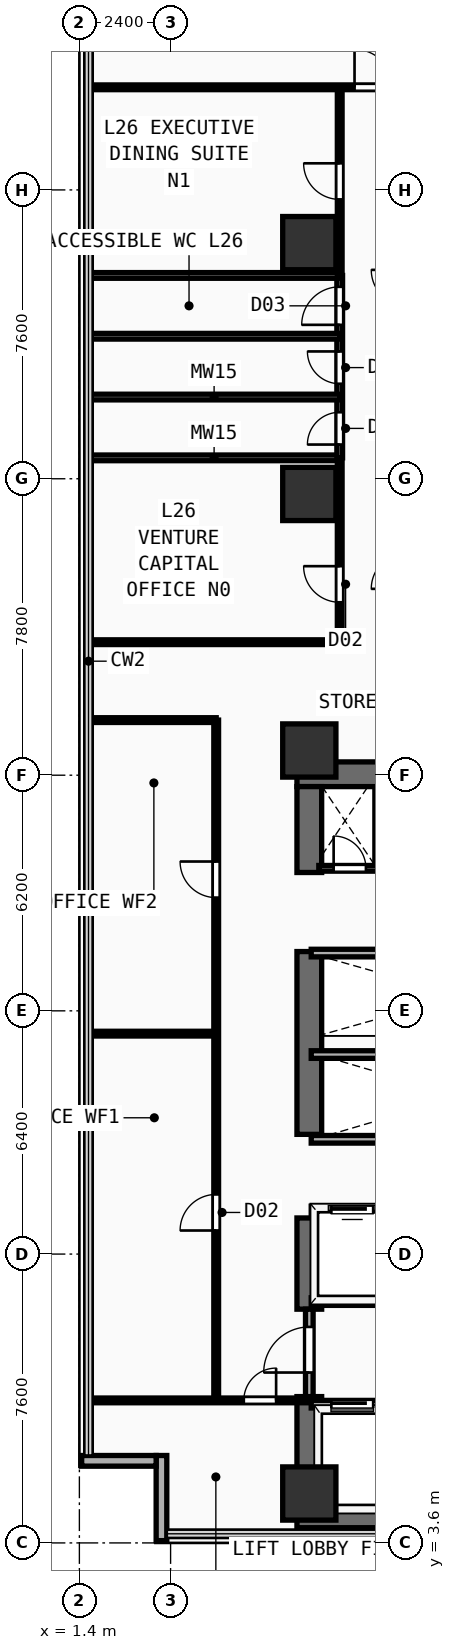
"""IFC4 building model, lengths in metres.
Left out: names, types, materials, properties, quantities, classifications, styles, units other than length and angle.
Written with IfcOpenShell. Run it as: python <this file> out.ifc"""

import sys

from ifc_helpers import new_model, si_unit, direction, frame, frame_2d, origin, origin_2d, place, context, subcontext, project, spatial, rectangle, extrude, element, fill, save


model = new_model("IFC4")
c1 = context("Model", 3, precision=1e-05, world=origin(), true_north=direction((0.0, 1.0)))
c2 = subcontext(c1, "Body", "Model", "MODEL_VIEW")
j1 = project(units=[si_unit("LENGTHUNIT", "METRE"), si_unit("PLANEANGLEUNIT", "RADIAN")], contexts=[c1])
p1 = place(None, origin())
s1 = spatial("IfcSite", under=j1, at=p1, CompositionType="ELEMENT")
p2 = place(p1, origin())
s2 = spatial("IfcBuilding", under=s1, at=p2, CompositionType="ELEMENT")
p3 = place(p2, frame((0.0, 0.0, 103.1)))
s3 = spatial("IfcBuildingStorey", under=s2, at=p3, CompositionType="ELEMENT", Elevation=103.1)
for number, where, z_axis, x_axis in (
    (1, (7.125, 4.325, 0.0), (0.0, 0.0, 1.0), (1.0, 0.0, 0.0)),
    (2, (7.125, 23.825, 0.0), (0.0, 0.0, 1.0), (1.0, 0.0, 0.0)),
):
    element("IfcWall", number, at=place(p3, frame(where, z_axis=z_axis, x_axis=x_axis)), inside=s3, PredefinedType="SHEAR", context=c2, shape_type="SweptSolid", body=[
        extrude(rectangle(XDim=14.0, YDim=0.65, at=frame_2d((7.0, 0.0))), origin(), (0.0, 0.0, 1.0), 3.54),
    ])
p4 = place(p3, frame((7.45, 4.65, 0.0), z_axis=(0.0, 0.0, 1.0), x_axis=(0.0, 1.0, 0.0)))
e3 = element("IfcWall", 3, at=p4, inside=s3, PredefinedType="SHEAR", context=c2, shape_type="SweptSolid", body=[
    extrude(rectangle(XDim=2.8, YDim=0.65, at=frame_2d((1.4, 0.0))), origin(), (0.0, 0.0, 1.0), 3.54),
])
p5 = place(p3, frame((7.45, 9.75, 0.0), z_axis=(0.0, 0.0, 1.0), x_axis=(0.0, 1.0, 0.0)))
e4 = element("IfcWall", 4, at=p5, inside=s3, PredefinedType="SHEAR", context=c2, shape_type="SweptSolid", body=[
    extrude(rectangle(XDim=2.4, YDim=0.65, at=frame_2d((1.2, 0.0))), origin(), (0.0, 0.0, 1.0), 3.54),
])
p6 = place(p3, frame((7.45, 14.35, 0.0), z_axis=(0.0, 0.0, 1.0), x_axis=(0.0, 1.0, 0.0)))
e5 = element("IfcWall", 5, at=p6, inside=s3, PredefinedType="SHEAR", context=c2, shape_type="SweptSolid", body=[
    extrude(rectangle(XDim=4.81, YDim=0.65, at=frame_2d((2.405, 0.0))), origin(), (0.0, 0.0, 1.0), 3.54),
])
p7 = place(p3, frame((7.45, 21.24, 0.0), z_axis=(0.0, 0.0, 1.0), x_axis=(0.0, 1.0, 0.0)))
e6 = element("IfcWall", 6, at=p7, inside=s3, PredefinedType="SHEAR", context=c2, shape_type="SweptSolid", body=[
    extrude(rectangle(XDim=2.26, YDim=0.65, at=frame_2d((1.13, 0.0))), origin(), (0.0, 0.0, 1.0), 3.54),
])
for number, where, z_axis, x_axis in (
    (7, (7.45, 4.9, 0.0), (0.0, 0.0, 1.0), (1.0, 0.0, 0.0)),
    (8, (7.45, 24.45, 0.0), (0.0, 0.0, 1.0), (1.0, 0.0, 0.0)),
    (9, (7.45, 31.2, 0.0), (0.0, 0.0, 1.0), (1.0, 0.0, 0.0)),
    (10, (7.45, 37.8, 0.0), (0.0, 0.0, 1.0), (1.0, 0.0, 0.0)),
):
    element("IfcColumn", number, at=place(p3, frame(where, z_axis=z_axis, x_axis=x_axis)), inside=s3, PredefinedType="COLUMN", context=c2, shape_type="SweptSolid", body=[
        extrude(rectangle(XDim=1.4, YDim=1.4, at=origin_2d()), origin(), (0.0, 0.0, 1.0), 3.54),
    ])
p8 = place(p3, frame((3.56, 3.66, 0.0), z_axis=(0.0, 0.0, 1.0), x_axis=(0.0, 1.0, 0.0)))
e11 = element("IfcWall", 11, at=p8, inside=s3, PredefinedType="SOLIDWALL", context=c2, shape_type="SweptSolid", body=[
    extrude(rectangle(XDim=2.24, YDim=0.28, at=frame_2d((1.12, 0.0))), origin(), (0.0, 0.0, 1.0), 3.54),
])
p9 = place(p3, frame((1.46, 5.76, 0.0), z_axis=(0.0, 0.0, 1.0), x_axis=(1.0, 0.0, 0.0)))
e12 = element("IfcWall", 12, at=p9, inside=s3, PredefinedType="SOLIDWALL", context=c2, shape_type="SweptSolid", body=[
    extrude(rectangle(XDim=1.96, YDim=0.28, at=frame_2d((0.98, 0.0))), origin(), (0.0, 0.0, 1.0), 3.54),
])
p10 = place(p3, frame((7.5, 7.25, 0.0), z_axis=(0.0, 0.0, 1.0), x_axis=(1.0, 0.0, 0.0)))
e13 = element("IfcWall", 13, at=p10, inside=s3, PredefinedType="PARTITIONING", context=c2, shape_type="SweptSolid", body=[
    extrude(rectangle(XDim=8.35, YDim=0.2, at=frame_2d((4.175, 0.0))), origin(), (0.0, 0.0, 1.0), 3.54),
])
p11 = place(p10, frame((0.53, 0.0, 0.0)))
e14 = element("IfcOpeningElement", 14, at=p11, cuts=e13, PredefinedType="OPENING", context=c2, shape_type="SweptSolid", body=[
    extrude(rectangle(XDim=1.1, YDim=2.2, at=frame_2d((0.55, 1.1))), frame((0.0, 0.11, 0.0), z_axis=(0.0, -1.0, 0.0), x_axis=(1.0, 0.0, 0.0)), (0.0, 0.0, 1.0), 0.22),
])
p12 = place(p10, frame((2.37, 0.0, 0.0)))
e15 = element("IfcOpeningElement", 15, at=p12, cuts=e13, PredefinedType="OPENING", context=c2, shape_type="SweptSolid", body=[
    extrude(rectangle(XDim=1.1, YDim=2.2, at=frame_2d((0.55, 1.1))), frame((0.0, 0.11, 0.0), z_axis=(0.0, -1.0, 0.0), x_axis=(1.0, 0.0, 0.0)), (0.0, 0.0, 1.0), 0.22),
])
p13 = place(p10, frame((4.33, 0.0, 0.0)))
e16 = element("IfcOpeningElement", 16, at=p13, cuts=e13, PredefinedType="OPENING", context=c2, shape_type="SweptSolid", body=[
    extrude(rectangle(XDim=1.1, YDim=2.2, at=frame_2d((0.55, 1.1))), frame((0.0, 0.11, 0.0), z_axis=(0.0, -1.0, 0.0), x_axis=(1.0, 0.0, 0.0)), (0.0, 0.0, 1.0), 0.22),
])
p14 = place(p10, frame((6.5, 0.0, 0.0)))
e17 = element("IfcOpeningElement", 17, at=p14, cuts=e13, PredefinedType="OPENING", context=c2, shape_type="SweptSolid", body=[
    extrude(rectangle(XDim=1.1, YDim=2.2, at=frame_2d((0.55, 1.1))), frame((0.0, 0.11, 0.0), z_axis=(0.0, -1.0, 0.0), x_axis=(1.0, 0.0, 0.0)), (0.0, 0.0, 1.0), 0.22),
])
p15 = place(p3, frame((7.5, 9.95, 0.0), z_axis=(0.0, 0.0, 1.0), x_axis=(1.0, 0.0, 0.0)))
e18 = element("IfcWall", 18, at=p15, inside=s3, PredefinedType="PARTITIONING", context=c2, shape_type="SweptSolid", body=[
    extrude(rectangle(XDim=8.35, YDim=0.2, at=frame_2d((4.175, 0.0))), origin(), (0.0, 0.0, 1.0), 3.54),
])
p16 = place(p3, frame((7.45, 7.45, 0.0), z_axis=(0.0, 0.0, 1.0), x_axis=(0.0, 1.0, 0.0)))
e19 = element("IfcWall", 19, at=p16, inside=s3, PredefinedType="PARTITIONING", context=c2, shape_type="SweptSolid", body=[
    extrude(rectangle(XDim=2.3, YDim=0.2, at=frame_2d((1.15, 0.0))), origin(), (0.0, 0.0, 1.0), 2.52),
])
p17 = place(p16, frame((0.633, 0.0, 0.0)))
e20 = element("IfcOpeningElement", 20, at=p17, cuts=e19, PredefinedType="OPENING", context=c2, shape_type="SweptSolid", body=[
    extrude(rectangle(XDim=1.2, YDim=2.25, at=frame_2d((0.6, 1.125))), frame((0.0, 0.11, 0.0), z_axis=(0.0, -1.0, 0.0), x_axis=(1.0, 0.0, 0.0)), (0.0, 0.0, 1.0), 0.22),
])
p18 = place(p3, frame((7.5, 12.36, 0.0), z_axis=(0.0, 0.0, 1.0), x_axis=(1.0, 0.0, 0.0)))
e21 = element("IfcWall", 21, at=p18, inside=s3, PredefinedType="PARTITIONING", context=c2, shape_type="SweptSolid", body=[
    extrude(rectangle(XDim=7.85, YDim=0.2, at=frame_2d((3.925, 0.0))), origin(), (0.0, 0.0, 1.0), 3.54),
])
p19 = place(p18, frame((0.53, 0.0, 0.0)))
e22 = element("IfcOpeningElement", 22, at=p19, cuts=e21, PredefinedType="OPENING", context=c2, shape_type="SweptSolid", body=[
    extrude(rectangle(XDim=1.1, YDim=2.2, at=frame_2d((0.55, 1.1))), frame((0.0, 0.11, 0.0), z_axis=(0.0, -1.0, 0.0), x_axis=(1.0, 0.0, 0.0)), (0.0, 0.0, 1.0), 0.22),
])
p20 = place(p18, frame((2.42, 0.0, 0.0)))
e23 = element("IfcOpeningElement", 23, at=p20, cuts=e21, PredefinedType="OPENING", context=c2, shape_type="SweptSolid", body=[
    extrude(rectangle(XDim=1.1, YDim=2.2, at=frame_2d((0.55, 1.1))), frame((0.0, 0.11, 0.0), z_axis=(0.0, -1.0, 0.0), x_axis=(1.0, 0.0, 0.0)), (0.0, 0.0, 1.0), 0.22),
])
p21 = place(p18, frame((4.31, 0.0, 0.0)))
e24 = element("IfcOpeningElement", 24, at=p21, cuts=e21, PredefinedType="OPENING", context=c2, shape_type="SweptSolid", body=[
    extrude(rectangle(XDim=1.1, YDim=2.2, at=frame_2d((0.55, 1.1))), frame((0.0, 0.11, 0.0), z_axis=(0.0, -1.0, 0.0), x_axis=(1.0, 0.0, 0.0)), (0.0, 0.0, 1.0), 0.22),
])
p22 = place(p18, frame((6.2, 0.0, 0.0)))
e25 = element("IfcOpeningElement", 25, at=p22, cuts=e21, PredefinedType="OPENING", context=c2, shape_type="SweptSolid", body=[
    extrude(rectangle(XDim=1.1, YDim=2.2, at=frame_2d((0.55, 1.1))), frame((0.0, 0.11, 0.0), z_axis=(0.0, -1.0, 0.0), x_axis=(1.0, 0.0, 0.0)), (0.0, 0.0, 1.0), 0.22),
])
for number, where, z_axis, x_axis in (
    (26, (7.5, 14.22, 0.0), (0.0, 0.0, 1.0), (1.0, 0.0, 0.0)),
    (27, (7.5, 16.45, 0.0), (0.0, 0.0, 1.0), (1.0, 0.0, 0.0)),
    (28, (7.5, 19.12, 0.0), (0.0, 0.0, 1.0), (1.0, 0.0, 0.0)),
):
    element("IfcWall", number, at=place(p3, frame(where, z_axis=z_axis, x_axis=x_axis)), inside=s3, PredefinedType="PARTITIONING", context=c2, shape_type="SweptSolid", body=[
        extrude(rectangle(XDim=7.85, YDim=0.2, at=frame_2d((3.925, 0.0))), origin(), (0.0, 0.0, 1.0), 3.54),
    ])
p23 = place(p3, frame((9.25, 21.35, 0.0), z_axis=(0.0, 0.0, 1.0), x_axis=(0.0, 1.0, 0.0)))
e29 = element("IfcWall", 29, at=p23, inside=s3, PredefinedType="PARTITIONING", context=c2, shape_type="SweptSolid", body=[
    extrude(rectangle(XDim=2.13, YDim=0.15, at=frame_2d((1.065, 0.0))), origin(), (0.0, 0.0, 1.0), 3.54),
])
p24 = place(p3, frame((7.7, 21.35, 0.0), z_axis=(0.0, 0.0, 1.0), x_axis=(1.0, 0.0, 0.0)))
e30 = element("IfcWall", 30, at=p24, inside=s3, PredefinedType="PARTITIONING", context=c2, shape_type="SweptSolid", body=[
    extrude(rectangle(XDim=1.55, YDim=0.15, at=frame_2d((0.775, 0.0))), origin(), (0.0, 0.0, 1.0), 3.54),
])
p25 = place(p24, frame((0.39, 0.0, 0.0)))
e31 = element("IfcOpeningElement", 31, at=p25, cuts=e30, PredefinedType="OPENING", context=c2, shape_type="SweptSolid", body=[
    extrude(rectangle(XDim=0.85, YDim=2.15, at=frame_2d((0.425, 1.075))), frame((0.0, 0.085, 0.0), z_axis=(0.0, -1.0, 0.0), x_axis=(1.0, 0.0, 0.0)), (0.0, 0.0, 1.0), 0.17),
])
p26 = place(p3, frame((8.25, 27.3, 0.0), z_axis=(0.0, 0.0, 1.0), x_axis=(0.0, 1.0, 0.0)))
e32 = element("IfcWall", 32, at=p26, inside=s3, PredefinedType="PARTITIONING", context=c2, shape_type="SweptSolid", body=[
    extrude(rectangle(XDim=4.85, YDim=0.125, at=frame_2d((2.425, 0.0))), origin(), (0.0, 0.0, 1.0), 3.54),
])
p27 = place(p26, frame((1.05, 0.0, 0.0)))
e33 = element("IfcOpeningElement", 33, at=p27, cuts=e32, PredefinedType="OPENING", context=c2, shape_type="SweptSolid", body=[
    extrude(rectangle(XDim=0.95, YDim=2.15, at=frame_2d((0.475, 1.075))), frame((0.0, 0.073, 0.0), z_axis=(0.0, -1.0, 0.0), x_axis=(1.0, 0.0, 0.0)), (0.0, 0.0, 1.0), 0.145),
])
p28 = place(p3, frame((1.64, 27.3, 0.0), z_axis=(0.0, 0.0, 1.0), x_axis=(1.0, 0.0, 0.0)))
e34 = element("IfcWall", 34, at=p28, inside=s3, PredefinedType="PARTITIONING", context=c2, shape_type="SweptSolid", body=[
    extrude(rectangle(XDim=6.61, YDim=0.125, at=frame_2d((3.305, 0.0))), origin(), (0.0, 0.0, 1.0), 3.54),
])
p29 = place(p3, frame((1.64, 32.15, 0.0), z_axis=(0.0, 0.0, 1.0), x_axis=(1.0, 0.0, 0.0)))
e35 = element("IfcWall", 35, at=p29, inside=s3, PredefinedType="PLUMBINGWALL", context=c2, shape_type="SweptSolid", body=[
    extrude(rectangle(XDim=6.61, YDim=0.15, at=frame_2d((3.305, 0.0))), origin(), (0.0, 0.0, 1.0), 3.54),
])
p30 = place(p3, frame((8.25, 32.15, 0.0), z_axis=(0.0, 0.0, 1.0), x_axis=(0.0, 1.0, 0.0)))
e36 = element("IfcWall", 36, at=p30, inside=s3, PredefinedType="PLUMBINGWALL", context=c2, shape_type="SweptSolid", body=[
    extrude(rectangle(XDim=4.8, YDim=0.15, at=frame_2d((2.4, 0.0))), origin(), (0.0, 0.0, 1.0), 3.54),
])
p31 = place(p30, frame((0.35, 0.0, 0.0)))
e37 = element("IfcOpeningElement", 37, at=p31, cuts=e36, PredefinedType="OPENING", context=c2, shape_type="SweptSolid", body=[
    extrude(rectangle(XDim=0.85, YDim=2.15, at=frame_2d((0.425, 1.075))), frame((0.0, 0.085, 0.0), z_axis=(0.0, -1.0, 0.0), x_axis=(1.0, 0.0, 0.0)), (0.0, 0.0, 1.0), 0.17),
])
p32 = place(p30, frame((1.95, 0.0, 0.0)))
e38 = element("IfcOpeningElement", 38, at=p32, cuts=e36, PredefinedType="OPENING", context=c2, shape_type="SweptSolid", body=[
    extrude(rectangle(XDim=0.85, YDim=2.15, at=frame_2d((0.425, 1.075))), frame((0.0, 0.085, 0.0), z_axis=(0.0, -1.0, 0.0), x_axis=(1.0, 0.0, 0.0)), (0.0, 0.0, 1.0), 0.17),
])
p33 = place(p30, frame((3.5, 0.0, 0.0)))
e39 = element("IfcOpeningElement", 39, at=p33, cuts=e36, PredefinedType="OPENING", context=c2, shape_type="SweptSolid", body=[
    extrude(rectangle(XDim=1.0, YDim=2.2, at=frame_2d((0.5, 1.1))), frame((0.0, 0.085, 0.0), z_axis=(0.0, -1.0, 0.0), x_axis=(1.0, 0.0, 0.0)), (0.0, 0.0, 1.0), 0.17),
])
for number, where, z_axis, x_axis in (
    (40, (1.64, 33.75, 0.0), (0.0, 0.0, 1.0), (1.0, 0.0, 0.0)),
    (41, (1.64, 35.35, 0.0), (0.0, 0.0, 1.0), (1.0, 0.0, 0.0)),
):
    element("IfcWall", number, at=place(p3, frame(where, z_axis=z_axis, x_axis=x_axis)), inside=s3, PredefinedType="PLUMBINGWALL", context=c2, shape_type="SweptSolid", body=[
        extrude(rectangle(XDim=6.61, YDim=0.15, at=frame_2d((3.305, 0.0))), origin(), (0.0, 0.0, 1.0), 3.09),
    ])
p34 = place(p3, frame((1.64, 36.95, 0.0), z_axis=(0.0, 0.0, 1.0), x_axis=(1.0, 0.0, 0.0)))
e42 = element("IfcWall", 42, at=p34, inside=s3, PredefinedType="PLUMBINGWALL", context=c2, shape_type="SweptSolid", body=[
    extrude(rectangle(XDim=6.61, YDim=0.15, at=frame_2d((3.305, 0.0))), origin(), (0.0, 0.0, 1.0), 3.54),
])
p35 = place(p3, frame((1.64, 7.35, 0.0), z_axis=(0.0, 0.0, 1.0), x_axis=(1.0, 0.0, 0.0)))
e43 = element("IfcWall", 43, at=p35, inside=s3, PredefinedType="PARTITIONING", context=c2, shape_type="SweptSolid", body=[
    extrude(rectangle(XDim=5.76, YDim=0.125, at=frame_2d((2.88, 0.0))), origin(), (0.0, 0.0, 1.0), 3.54),
])
p36 = place(p35, frame((4.087, 0.0, 0.0)))
e44 = element("IfcOpeningElement", 44, at=p36, cuts=e43, PredefinedType="OPENING", context=c2, shape_type="SweptSolid", body=[
    extrude(rectangle(XDim=0.85, YDim=2.15, at=frame_2d((0.425, 1.075))), frame((0.0, 0.073, 0.0), z_axis=(0.0, -1.0, 0.0), x_axis=(1.0, 0.0, 0.0)), (0.0, 0.0, 1.0), 0.145),
])
p37 = place(p3, frame((5.0, 7.5, 0.0), z_axis=(0.0, 0.0, 1.0), x_axis=(0.0, 1.0, 0.0)))
e45 = element("IfcWall", 45, at=p37, inside=s3, PredefinedType="PARTITIONING", context=c2, shape_type="SweptSolid", body=[
    extrude(rectangle(XDim=17.75, YDim=0.125, at=frame_2d((8.875, 0.0))), origin(), (0.0, 0.0, 1.0), 3.54),
])
p38 = place(p37, frame((4.32, 0.0, 0.0)))
e46 = element("IfcOpeningElement", 46, at=p38, cuts=e45, PredefinedType="OPENING", context=c2, shape_type="SweptSolid", body=[
    extrude(rectangle(XDim=0.95, YDim=2.15, at=frame_2d((0.475, 1.075))), frame((0.0, 0.073, 0.0), z_axis=(0.0, -1.0, 0.0), x_axis=(1.0, 0.0, 0.0)), (0.0, 0.0, 1.0), 0.145),
])
p39 = place(p37, frame((13.079, 0.0, 0.0)))
e47 = element("IfcOpeningElement", 47, at=p39, cuts=e45, PredefinedType="OPENING", context=c2, shape_type="SweptSolid", body=[
    extrude(rectangle(XDim=0.95, YDim=2.15, at=frame_2d((0.475, 1.075))), frame((0.0, 0.073, 0.0), z_axis=(0.0, -1.0, 0.0), x_axis=(1.0, 0.0, 0.0)), (0.0, 0.0, 1.0), 0.145),
])
for number, where, z_axis, x_axis in (
    (48, (1.64, 25.25, 0.0), (0.0, 0.0, 1.0), (1.0, 0.0, 0.0)),
    (49, (1.64, 17.0, 0.0), (0.0, 0.0, 1.0), (1.0, 0.0, 0.0)),
):
    element("IfcWall", number, at=place(p3, frame(where, z_axis=z_axis, x_axis=x_axis)), inside=s3, PredefinedType="PARTITIONING", context=c2, shape_type="SweptSolid", body=[
        extrude(rectangle(XDim=3.36, YDim=0.125, at=frame_2d((1.68, 0.0))), origin(), (0.0, 0.0, 1.0), 3.54),
    ])
p40 = place(p3, frame((8.25, 36.95, 0.0), z_axis=(0.0, 0.0, 1.0), x_axis=(0.0, 1.0, 0.0)))
e50 = element("IfcWall", 50, at=p40, inside=s3, PredefinedType="PARTITIONING", context=c2, shape_type="SweptSolid", body=[
    extrude(rectangle(XDim=4.95, YDim=0.125, at=frame_2d((2.475, 0.0))), origin(), (0.0, 0.0, 1.0), 3.54),
])
p41 = place(p40, frame((2.0, 0.0, 0.0)))
e51 = element("IfcOpeningElement", 51, at=p41, cuts=e50, PredefinedType="OPENING", context=c2, shape_type="SweptSolid", body=[
    extrude(rectangle(XDim=0.95, YDim=2.15, at=frame_2d((0.475, 1.075))), frame((0.0, 0.073, 0.0), z_axis=(0.0, -1.0, 0.0), x_axis=(1.0, 0.0, 0.0)), (0.0, 0.0, 1.0), 0.145),
])
p42 = place(p3, frame((1.64, 41.9, 0.0), z_axis=(0.0, 0.0, 1.0), x_axis=(1.0, 0.0, 0.0)))
e52 = element("IfcWall", 52, at=p42, inside=s3, PredefinedType="PARTITIONING", context=c2, shape_type="SweptSolid", body=[
    extrude(rectangle(XDim=22.12, YDim=0.125, at=frame_2d((11.06, 0.0))), origin(), (0.0, 0.0, 1.0), 3.54),
])
p43 = place(p42, frame((7.0, 0.0, 0.0)))
e53 = element("IfcOpeningElement", 53, at=p43, cuts=e52, PredefinedType="OPENING", context=c2, shape_type="SweptSolid", body=[
    extrude(rectangle(XDim=1.0, YDim=2.2, at=frame_2d((0.5, 1.1))), frame((0.0, 0.073, 0.0), z_axis=(0.0, -1.0, 0.0), x_axis=(1.0, 0.0, 0.0)), (0.0, 0.0, 1.0), 0.145),
])
p44 = place(p11, origin())
e54 = element("IfcDoor", 54, at=p44, inside=s3, OperationType="SLIDING_TO_LEFT", PredefinedType="DOOR", context=c2, shape_type="SweptSolid", body=[
    extrude(rectangle(XDim=1.1, YDim=2.2, at=frame_2d((0.55, 1.1))), frame((0.0, 0.025, 0.0), z_axis=(0.0, -1.0, 0.0), x_axis=(1.0, 0.0, 0.0)), (0.0, 0.0, 1.0), 0.05),
])
fill(e14, e54)
p45 = place(p17, frame((1.2, 0.0, 0.0), z_axis=(0.0, 0.0, 1.0), x_axis=(-1.0, 0.0, 0.0)))
e55 = element("IfcDoor", 55, at=p45, inside=s3, OperationType="SINGLE_SWING_RIGHT", PredefinedType="DOOR", context=c2, shape_type="SweptSolid", body=[
    extrude(rectangle(XDim=1.2, YDim=2.25, at=frame_2d((0.6, 1.125))), frame((0.0, 0.025, 0.0), z_axis=(0.0, -1.0, 0.0), x_axis=(1.0, 0.0, 0.0)), (0.0, 0.0, 1.0), 0.05),
])
fill(e20, e55)
p46 = place(p19, origin())
e56 = element("IfcDoor", 56, at=p46, inside=s3, OperationType="SLIDING_TO_LEFT", PredefinedType="DOOR", context=c2, shape_type="SweptSolid", body=[
    extrude(rectangle(XDim=1.1, YDim=2.2, at=frame_2d((0.55, 1.1))), frame((0.0, 0.025, 0.0), z_axis=(0.0, -1.0, 0.0), x_axis=(1.0, 0.0, 0.0)), (0.0, 0.0, 1.0), 0.05),
])
fill(e22, e56)
p47 = place(p25, origin())
e57 = element("IfcDoor", 57, at=p47, inside=s3, OperationType="SINGLE_SWING_LEFT", PredefinedType="DOOR", context=c2, shape_type="SweptSolid", body=[
    extrude(rectangle(XDim=0.85, YDim=2.15, at=frame_2d((0.425, 1.075))), frame((0.0, 0.025, 0.0), z_axis=(0.0, -1.0, 0.0), x_axis=(1.0, 0.0, 0.0)), (0.0, 0.0, 1.0), 0.05),
])
fill(e31, e57)
p48 = place(p27, origin())
e58 = element("IfcDoor", 58, at=p48, inside=s3, OperationType="SINGLE_SWING_RIGHT", PredefinedType="DOOR", context=c2, shape_type="SweptSolid", body=[
    extrude(rectangle(XDim=0.95, YDim=2.15, at=frame_2d((0.475, 1.075))), frame((0.0, 0.025, 0.0), z_axis=(0.0, -1.0, 0.0), x_axis=(1.0, 0.0, 0.0)), (0.0, 0.0, 1.0), 0.05),
])
fill(e33, e58)
p49 = place(p31, origin())
e59 = element("IfcDoor", 59, at=p49, inside=s3, OperationType="SINGLE_SWING_LEFT", PredefinedType="DOOR", context=c2, shape_type="SweptSolid", body=[
    extrude(rectangle(XDim=0.85, YDim=2.15, at=frame_2d((0.425, 1.075))), frame((0.0, 0.025, 0.0), z_axis=(0.0, -1.0, 0.0), x_axis=(1.0, 0.0, 0.0)), (0.0, 0.0, 1.0), 0.05),
])
fill(e37, e59)
p50 = place(p32, origin())
e60 = element("IfcDoor", 60, at=p50, inside=s3, OperationType="SINGLE_SWING_RIGHT", PredefinedType="DOOR", context=c2, shape_type="SweptSolid", body=[
    extrude(rectangle(XDim=0.85, YDim=2.15, at=frame_2d((0.425, 1.075))), frame((0.0, 0.025, 0.0), z_axis=(0.0, -1.0, 0.0), x_axis=(1.0, 0.0, 0.0)), (0.0, 0.0, 1.0), 0.05),
])
fill(e38, e60)
p51 = place(p33, origin())
e61 = element("IfcDoor", 61, at=p51, inside=s3, OperationType="SINGLE_SWING_LEFT", PredefinedType="DOOR", context=c2, shape_type="SweptSolid", body=[
    extrude(rectangle(XDim=1.0, YDim=2.2, at=frame_2d((0.5, 1.1))), frame((0.0, 0.025, 0.0), z_axis=(0.0, -1.0, 0.0), x_axis=(1.0, 0.0, 0.0)), (0.0, 0.0, 1.0), 0.05),
])
fill(e39, e61)
p52 = place(p36, origin())
e62 = element("IfcDoor", 62, at=p52, inside=s3, OperationType="SINGLE_SWING_RIGHT", PredefinedType="DOOR", context=c2, shape_type="SweptSolid", body=[
    extrude(rectangle(XDim=0.85, YDim=2.15, at=frame_2d((0.425, 1.075))), frame((0.0, 0.025, 0.0), z_axis=(0.0, -1.0, 0.0), x_axis=(1.0, 0.0, 0.0)), (0.0, 0.0, 1.0), 0.05),
])
fill(e44, e62)
p53 = place(p38, origin())
e63 = element("IfcDoor", 63, at=p53, inside=s3, OperationType="SINGLE_SWING_LEFT", PredefinedType="DOOR", context=c2, shape_type="SweptSolid", body=[
    extrude(rectangle(XDim=0.95, YDim=2.15, at=frame_2d((0.475, 1.075))), frame((0.0, 0.025, 0.0), z_axis=(0.0, -1.0, 0.0), x_axis=(1.0, 0.0, 0.0)), (0.0, 0.0, 1.0), 0.05),
])
fill(e46, e63)
p54 = place(p39, origin())
e64 = element("IfcDoor", 64, at=p54, inside=s3, OperationType="SINGLE_SWING_RIGHT", PredefinedType="DOOR", context=c2, shape_type="SweptSolid", body=[
    extrude(rectangle(XDim=0.95, YDim=2.15, at=frame_2d((0.475, 1.075))), frame((0.0, 0.025, 0.0), z_axis=(0.0, -1.0, 0.0), x_axis=(1.0, 0.0, 0.0)), (0.0, 0.0, 1.0), 0.05),
])
fill(e47, e64)
p55 = place(p41, origin())
e65 = element("IfcDoor", 65, at=p55, inside=s3, OperationType="SINGLE_SWING_RIGHT", PredefinedType="DOOR", context=c2, shape_type="SweptSolid", body=[
    extrude(rectangle(XDim=0.95, YDim=2.15, at=frame_2d((0.475, 1.075))), frame((0.0, 0.025, 0.0), z_axis=(0.0, -1.0, 0.0), x_axis=(1.0, 0.0, 0.0)), (0.0, 0.0, 1.0), 0.05),
])
fill(e51, e65)
p56 = place(p43, origin())
e66 = element("IfcDoor", 66, at=p56, inside=s3, OperationType="SINGLE_SWING_LEFT", PredefinedType="DOOR", context=c2, shape_type="SweptSolid", body=[
    extrude(rectangle(XDim=1.0, YDim=2.2, at=frame_2d((0.5, 1.1))), frame((0.0, 0.025, 0.0), z_axis=(0.0, -1.0, 0.0), x_axis=(1.0, 0.0, 0.0)), (0.0, 0.0, 1.0), 0.05),
])
fill(e53, e66)
save(model, sys.argv[1])
